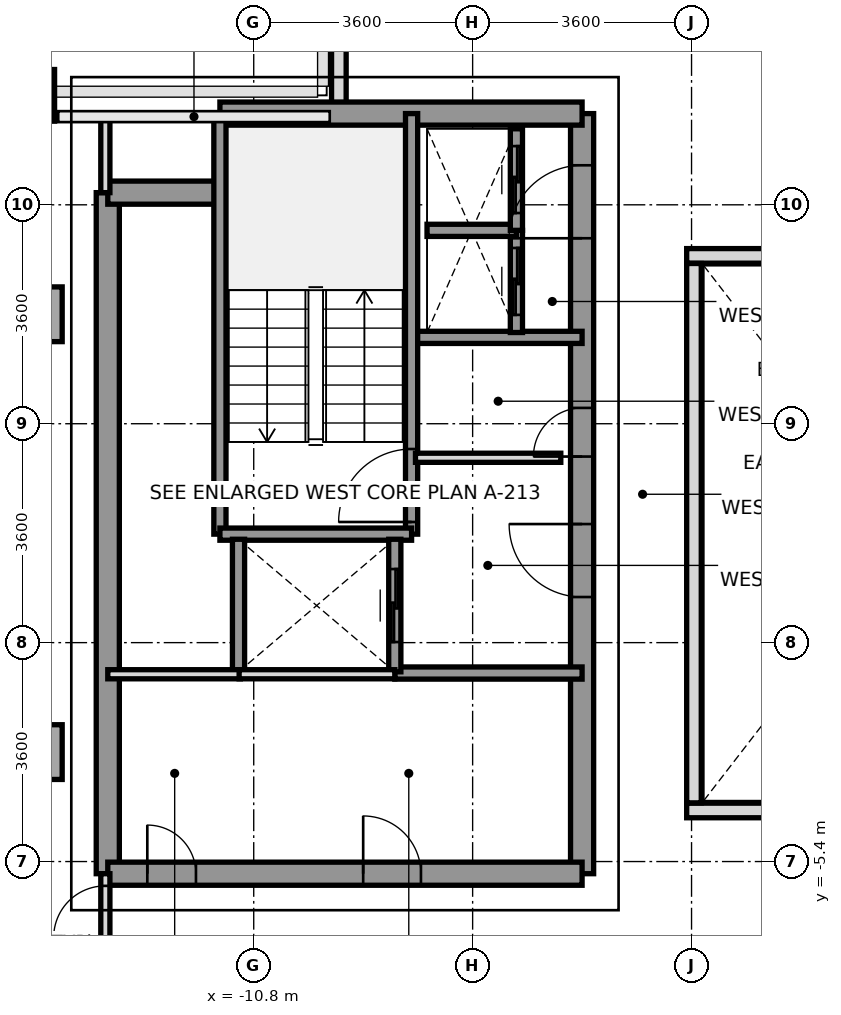
"""IFC4 building model, lengths in metres.
Left out: names, types, materials, properties, quantities, classifications, styles, units other than length and angle.
Written with IfcOpenShell. Run it as: python <this file> out.ifc"""

import sys

from ifc_helpers import new_model, si_unit, direction, frame, frame_2d, origin, origin_2d, place, context, subcontext, project, spatial, rectangle, extrude, source, transform, mapped, element, fill, save


model = new_model("IFC4")
c1 = context("Model", 3, precision=1e-05, world=origin(), true_north=direction((0.0, 1.0)))
c2 = subcontext(c1, "Body", "Model", "MODEL_VIEW")
j1 = project(units=[si_unit("LENGTHUNIT", "METRE"), si_unit("PLANEANGLEUNIT", "RADIAN")], contexts=[c1])
p1 = place(None, origin())
s1 = spatial("IfcSite", under=j1, at=p1, CompositionType="ELEMENT")
p2 = place(p1, origin())
s2 = spatial("IfcBuilding", under=s1, at=p2, CompositionType="ELEMENT")
p3 = place(p2, frame((0.0, 0.0, 208.0)))
s3 = spatial("IfcBuildingStorey", under=s2, at=p3, CompositionType="ELEMENT", Elevation=208.0)
m1 = source(origin(), c2, "Body", "SweptSolid", [
    extrude(rectangle(XDim=0.9, YDim=0.9, at=origin_2d()), origin(), (0.0, 0.0, 1.0), 3.2),
])
for number, where, z_axis, x_axis in (
    (1, (-14.4, -3.6, 0.0), (0.0, 0.0, 1.0), (1.0, 0.0, 0.0)),
    (2, (-14.4, 3.6, 0.0), (0.0, 0.0, 1.0), (1.0, 0.0, 0.0)),
):
    element("IfcColumn", number, at=place(p3, frame(where, z_axis=z_axis, x_axis=x_axis)), inside=s3, PredefinedType="COLUMN", context=c2, shape_type="MappedRepresentation", body=[
        mapped(m1, transform((0.0, 0.0, 0.0), x_axis=(1.0, 0.0, 0.0), y_axis=(0.0, 1.0, 0.0), z_axis=(0.0, 0.0, 1.0), scale=1.0)),
    ])
m2 = source(origin(), c2, "Body", "SweptSolid", [
    extrude(rectangle(XDim=0.65, YDim=0.85, at=origin_2d()), origin(), (0.0, 0.0, 1.0), 3.2),
])
p4 = place(p3, frame((-14.4, 7.2, 0.0), z_axis=(0.0, 0.0, 1.0), x_axis=(1.0, 0.0, 0.0)))
e3 = element("IfcColumn", 3, at=p4, inside=s3, PredefinedType="COLUMN", context=c2, shape_type="MappedRepresentation", body=[
    mapped(m2, transform((0.0, 0.0, 0.0), x_axis=(1.0, 0.0, 0.0), y_axis=(0.0, 1.0, 0.0), z_axis=(0.0, 0.0, 1.0), scale=1.0)),
])
p5 = place(p3, frame((-9.4, 6.953, 0.0), z_axis=(0.0, 0.0, 1.0), x_axis=(0.0, 1.0, 0.0)))
e4 = element("IfcWall", 4, at=p5, inside=s3, PredefinedType="PARAPET", context=c2, shape_type="SweptSolid", body=[
    extrude(rectangle(XDim=1.594, YDim=0.24, at=frame_2d((0.797, 0.0))), origin(), (0.0, 0.0, 1.0), 1.15),
])
p6 = place(p3, frame((-13.2, -5.6, 0.0), z_axis=(0.0, 0.0, 1.0), x_axis=(0.0, 1.0, 0.0)))
e5 = element("IfcWall", 5, at=p6, inside=s3, PredefinedType="SHEAR", context=c2, shape_type="SweptSolid", body=[
    extrude(rectangle(XDim=11.2, YDim=0.38, at=frame_2d((5.6, 0.0))), origin(), (0.0, 0.0, 1.0), 3.2),
])
p7 = place(p3, frame((-5.4, -5.6, 0.0), z_axis=(0.0, 0.0, 1.0), x_axis=(0.0, 1.0, 0.0)))
e6 = element("IfcWall", 6, at=p7, inside=s3, PredefinedType="SHEAR", context=c2, shape_type="SweptSolid", body=[
    extrude(rectangle(XDim=12.5, YDim=0.38, at=frame_2d((6.25, 0.0))), origin(), (0.0, 0.0, 1.0), 3.2),
])
p8 = place(p7, frame((4.55, 0.0, 0.0)))
e7 = element("IfcOpeningElement", 7, at=p8, cuts=e6, PredefinedType="OPENING", context=c2, shape_type="SweptSolid", body=[
    extrude(rectangle(XDim=1.2, YDim=2.2, at=frame_2d((0.6, 1.1))), frame((0.0, 0.2, 0.0), z_axis=(0.0, -1.0, 0.0), x_axis=(1.0, 0.0, 0.0)), (0.0, 0.0, 1.0), 0.4),
])
p9 = place(p7, frame((10.45, 0.0, 0.0)))
e8 = element("IfcOpeningElement", 8, at=p9, cuts=e6, PredefinedType="OPENING", context=c2, shape_type="SweptSolid", body=[
    extrude(rectangle(XDim=1.2, YDim=2.2, at=frame_2d((0.6, 1.1))), frame((0.0, 0.2, 0.0), z_axis=(0.0, -1.0, 0.0), x_axis=(1.0, 0.0, 0.0)), (0.0, 0.0, 1.0), 0.4),
])
p10 = place(p7, frame((6.86, 0.0, 0.0)))
e9 = element("IfcOpeningElement", 9, at=p10, cuts=e6, PredefinedType="OPENING", context=c2, shape_type="SweptSolid", body=[
    extrude(rectangle(XDim=0.8, YDim=2.1, at=frame_2d((0.4, 1.05))), frame((0.0, 0.2, 0.0), z_axis=(0.0, -1.0, 0.0), x_axis=(1.0, 0.0, 0.0)), (0.0, 0.0, 1.0), 0.4),
])
p11 = place(p3, frame((-11.356, 6.9, 0.0), z_axis=(0.0, 0.0, 1.0), x_axis=(1.0, 0.0, 0.0)))
e10 = element("IfcWall", 10, at=p11, inside=s3, PredefinedType="SHEAR", context=c2, shape_type="SweptSolid", body=[
    extrude(rectangle(XDim=5.956, YDim=0.38, at=frame_2d((2.978, 0.0))), origin(), (0.0, 0.0, 1.0), 3.2),
])
p12 = place(p3, frame((-13.2, 5.6, 0.0), z_axis=(0.0, 0.0, 1.0), x_axis=(1.0, 0.0, 0.0)))
e11 = element("IfcWall", 11, at=p12, inside=s3, PredefinedType="SHEAR", context=c2, shape_type="SweptSolid", body=[
    extrude(rectangle(XDim=1.844, YDim=0.38, at=frame_2d((0.922, 0.0))), origin(), (0.0, 0.0, 1.0), 3.2),
])
p13 = place(p3, frame((-13.2, -5.6, 0.0), z_axis=(0.0, 0.0, 1.0), x_axis=(1.0, 0.0, 0.0)))
e12 = element("IfcWall", 12, at=p13, inside=s3, PredefinedType="SHEAR", context=c2, shape_type="SweptSolid", body=[
    extrude(rectangle(XDim=7.8, YDim=0.38, at=frame_2d((3.9, 0.0))), origin(), (0.0, 0.0, 1.0), 3.2),
])
p14 = place(p13, frame((0.65, 0.0, 0.0)))
e13 = element("IfcOpeningElement", 13, at=p14, cuts=e12, PredefinedType="OPENING", context=c2, shape_type="SweptSolid", body=[
    extrude(rectangle(XDim=0.8, YDim=2.1, at=frame_2d((0.4, 1.05))), frame((0.0, 0.2, 0.0), z_axis=(0.0, -1.0, 0.0), x_axis=(1.0, 0.0, 0.0)), (0.0, 0.0, 1.0), 0.4),
])
p15 = place(p13, frame((4.2, 0.0, 0.0)))
e14 = element("IfcOpeningElement", 14, at=p15, cuts=e12, PredefinedType="OPENING", context=c2, shape_type="SweptSolid", body=[
    extrude(rectangle(XDim=0.95, YDim=2.15, at=frame_2d((0.475, 1.075))), frame((0.0, 0.2, 0.0), z_axis=(0.0, -1.0, 0.0), x_axis=(1.0, 0.0, 0.0)), (0.0, 0.0, 1.0), 0.4),
])
p16 = place(p3, frame((-8.18, 3.22, 0.0), z_axis=(0.0, 0.0, 1.0), x_axis=(1.0, 0.0, 0.0)))
e15 = element("IfcWall", 15, at=p16, inside=s3, PredefinedType="SOLIDWALL", context=c2, shape_type="SweptSolid", body=[
    extrude(rectangle(XDim=2.78, YDim=0.2, at=frame_2d((1.39, 0.0))), origin(), (0.0, 0.0, 1.0), 3.2),
])
p17 = place(p3, frame((-8.48, -2.3, 0.0), z_axis=(0.0, 0.0, 1.0), x_axis=(1.0, 0.0, 0.0)))
e16 = element("IfcWall", 16, at=p17, inside=s3, PredefinedType="SOLIDWALL", context=c2, shape_type="SweptSolid", body=[
    extrude(rectangle(XDim=3.08, YDim=0.2, at=frame_2d((1.54, 0.0))), origin(), (0.0, 0.0, 1.0), 3.2),
])
p18 = place(p3, frame((-8.204, -0.016, 0.0), z_axis=(0.0, 0.0, 1.0), x_axis=(0.0, 1.0, 0.0)))
e17 = element("IfcWall", 17, at=p18, inside=s3, PredefinedType="SOLIDWALL", context=c2, shape_type="SweptSolid", body=[
    extrude(rectangle(XDim=6.916, YDim=0.2, at=frame_2d((3.458, 0.0))), origin(), (0.0, 0.0, 1.0), 3.2),
])
p19 = place(p18, frame((0.2, 0.0, 0.0)))
e18 = element("IfcOpeningElement", 18, at=p19, cuts=e17, PredefinedType="OPENING", context=c2, shape_type="SweptSolid", body=[
    extrude(rectangle(XDim=1.2, YDim=2.2, at=frame_2d((0.6, 1.1))), frame((0.0, 0.11, 0.0), z_axis=(0.0, -1.0, 0.0), x_axis=(1.0, 0.0, 0.0)), (0.0, 0.0, 1.0), 0.22),
])
p20 = place(p3, frame((-11.356, -0.016, 0.0), z_axis=(0.0, 0.0, 1.0), x_axis=(0.0, 1.0, 0.0)))
e19 = element("IfcWall", 19, at=p20, inside=s3, PredefinedType="SOLIDWALL", context=c2, shape_type="SweptSolid", body=[
    extrude(rectangle(XDim=6.916, YDim=0.2, at=frame_2d((3.458, 0.0))), origin(), (0.0, 0.0, 1.0), 3.2),
])
p21 = place(p3, frame((-11.356, -0.016, 0.0), z_axis=(0.0, 0.0, 1.0), x_axis=(1.0, 0.0, 0.0)))
e20 = element("IfcWall", 20, at=p21, inside=s3, PredefinedType="SOLIDWALL", context=c2, shape_type="SweptSolid", body=[
    extrude(rectangle(XDim=3.152, YDim=0.2, at=frame_2d((1.576, 0.0))), origin(), (0.0, 0.0, 1.0), 3.2),
])
p22 = place(p3, frame((-11.05, -2.28, 0.0), z_axis=(0.0, 0.0, 1.0), x_axis=(0.0, 1.0, 0.0)))
e21 = element("IfcWall", 21, at=p22, inside=s3, PredefinedType="SOLIDWALL", context=c2, shape_type="SweptSolid", body=[
    extrude(rectangle(XDim=2.18, YDim=0.2, at=frame_2d((1.09, 0.0))), origin(), (0.0, 0.0, 1.0), 3.2),
])
p23 = place(p3, frame((-8.48, -2.28, 0.0), z_axis=(0.0, 0.0, 1.0), x_axis=(0.0, 1.0, 0.0)))
e22 = element("IfcWall", 22, at=p23, inside=s3, PredefinedType="SOLIDWALL", context=c2, shape_type="SweptSolid", body=[
    extrude(rectangle(XDim=2.18, YDim=0.2, at=frame_2d((1.09, 0.0))), origin(), (0.0, 0.0, 1.0), 3.2),
])
p24 = place(p23, frame((0.49, 0.0, 0.0)))
e23 = element("IfcOpeningElement", 23, at=p24, cuts=e22, PredefinedType="OPENING", context=c2, shape_type="SweptSolid", body=[
    extrude(rectangle(XDim=1.2, YDim=2.2, at=frame_2d((0.6, 1.1))), frame((0.0, 0.11, 0.0), z_axis=(0.0, -1.0, 0.0), x_axis=(1.0, 0.0, 0.0)), (0.0, 0.0, 1.0), 0.22),
])
p25 = place(p3, frame((-6.48, 3.3, 0.0), z_axis=(0.0, 0.0, 1.0), x_axis=(0.0, 1.0, 0.0)))
e24 = element("IfcWall", 24, at=p25, inside=s3, PredefinedType="SOLIDWALL", context=c2, shape_type="SweptSolid", body=[
    extrude(rectangle(XDim=1.68, YDim=0.2, at=frame_2d((0.84, 0.0))), origin(), (0.0, 0.0, 1.0), 3.2),
])
p26 = place(p25, frame((0.29, 0.0, 0.0)))
e25 = element("IfcOpeningElement", 25, at=p26, cuts=e24, PredefinedType="OPENING", context=c2, shape_type="SweptSolid", body=[
    extrude(rectangle(XDim=1.1, YDim=2.2, at=frame_2d((0.55, 1.1))), frame((0.0, 0.11, 0.0), z_axis=(0.0, -1.0, 0.0), x_axis=(1.0, 0.0, 0.0)), (0.0, 0.0, 1.0), 0.22),
])
p27 = place(p3, frame((-7.95, 4.98, 0.0), z_axis=(0.0, 0.0, 1.0), x_axis=(1.0, 0.0, 0.0)))
e26 = element("IfcWall", 26, at=p27, inside=s3, PredefinedType="SOLIDWALL", context=c2, shape_type="SweptSolid", body=[
    extrude(rectangle(XDim=1.47, YDim=0.2, at=frame_2d((0.735, 0.0))), origin(), (0.0, 0.0, 1.0), 3.2),
])
p28 = place(p3, frame((-6.48, 4.98, 0.0), z_axis=(0.0, 0.0, 1.0), x_axis=(0.0, 1.0, 0.0)))
e27 = element("IfcWall", 27, at=p28, inside=s3, PredefinedType="SOLIDWALL", context=c2, shape_type="SweptSolid", body=[
    extrude(rectangle(XDim=1.67, YDim=0.2, at=frame_2d((0.835, 0.0))), origin(), (0.0, 0.0, 1.0), 3.2),
])
p29 = place(p28, frame((0.285, 0.0, 0.0)))
e28 = element("IfcOpeningElement", 28, at=p29, cuts=e27, PredefinedType="OPENING", context=c2, shape_type="SweptSolid", body=[
    extrude(rectangle(XDim=1.1, YDim=2.2, at=frame_2d((0.55, 1.1))), frame((0.0, 0.11, 0.0), z_axis=(0.0, -1.0, 0.0), x_axis=(1.0, 0.0, 0.0)), (0.0, 0.0, 1.0), 0.22),
])
p30 = place(p3, frame((-8.14, 1.24, 0.0), z_axis=(0.0, 0.0, 1.0), x_axis=(1.0, 0.0, 0.0)))
e29 = element("IfcWall", 29, at=p30, inside=s3, PredefinedType="PARTITIONING", context=c2, shape_type="SweptSolid", body=[
    extrude(rectangle(XDim=2.39, YDim=0.15, at=frame_2d((1.195, 0.0))), origin(), (0.0, 0.0, 1.0), 2.3),
])
p31 = place(p3, frame((-13.2, -2.32, 0.0), z_axis=(0.0, 0.0, 1.0), x_axis=(1.0, 0.0, 0.0)))
e30 = element("IfcWall", 30, at=p31, inside=s3, PredefinedType="PARTITIONING", context=c2, shape_type="SweptSolid", body=[
    extrude(rectangle(XDim=2.18, YDim=0.15, at=frame_2d((1.09, 0.0))), origin(), (0.0, 0.0, 1.0), 3.2),
])
p32 = place(p3, frame((-11.04, -2.32, 0.0), z_axis=(0.0, 0.0, 1.0), x_axis=(1.0, 0.0, 0.0)))
e31 = element("IfcWall", 31, at=p32, inside=s3, PredefinedType="PARTITIONING", context=c2, shape_type="SweptSolid", body=[
    extrude(rectangle(XDim=2.56, YDim=0.15, at=frame_2d((1.28, 0.0))), origin(), (0.0, 0.0, 1.0), 3.2),
])
p33 = place(p3, frame((-13.24, 5.6, 0.0), z_axis=(0.0, 0.0, 1.0), x_axis=(0.0, 1.0, 0.0)))
e32 = element("IfcWall", 32, at=p33, inside=s3, PredefinedType="PARTITIONING", context=c2, shape_type="SweptSolid", body=[
    extrude(rectangle(XDim=1.25, YDim=0.15, at=frame_2d((0.625, 0.0))), origin(), (0.0, 0.0, 1.0), 3.2),
])
p34 = place(p3, frame((-13.24, -6.85, 0.0), z_axis=(0.0, 0.0, 1.0), x_axis=(0.0, 1.0, 0.0)))
e33 = element("IfcWall", 33, at=p34, inside=s3, PredefinedType="PARTITIONING", context=c2, shape_type="SweptSolid", body=[
    extrude(rectangle(XDim=1.25, YDim=0.15, at=frame_2d((0.625, 0.0))), origin(), (0.0, 0.0, 1.0), 3.2),
])
p35 = place(p34, frame((0.2, 0.0, 0.0)))
e34 = element("IfcOpeningElement", 34, at=p35, cuts=e33, PredefinedType="OPENING", context=c2, shape_type="SweptSolid", body=[
    extrude(rectangle(XDim=0.85, YDim=2.1, at=frame_2d((0.425, 1.05))), frame((0.0, 0.085, 0.0), z_axis=(0.0, -1.0, 0.0), x_axis=(1.0, 0.0, 0.0)), (0.0, 0.0, 1.0), 0.17),
])
for number, where, z_axis, x_axis in (
    (35, (-3.68, -4.56, 0.0), (0.0, 0.0, 1.0), (1.0, 0.0, 0.0)),
    (36, (-3.68, 4.56, 0.0), (0.0, 0.0, 1.0), (1.0, 0.0, 0.0)),
):
    element("IfcWall", number, at=place(p3, frame(where, z_axis=z_axis, x_axis=x_axis)), inside=s3, PredefinedType="PARAPET", context=c2, shape_type="SweptSolid", body=[
        extrude(rectangle(XDim=7.36, YDim=0.24, at=frame_2d((3.68, 0.0))), origin(), (0.0, 0.0, 1.0), 1.15),
    ])
p36 = place(p3, frame((-3.56, -4.435, 0.0), z_axis=(0.0, 0.0, 1.0), x_axis=(0.0, 1.0, 0.0)))
e37 = element("IfcWall", 37, at=p36, inside=s3, PredefinedType="PARAPET", context=c2, shape_type="SweptSolid", body=[
    extrude(rectangle(XDim=8.87, YDim=0.24, at=frame_2d((4.435, 0.0))), origin(), (0.0, 0.0, 1.0), 1.15),
])
m3 = source(origin(), c2, "Body", "SweptSolid", [
    extrude(rectangle(XDim=1.2, YDim=2.2, at=frame_2d((0.6, 1.1))), frame((0.0, 0.025, 0.0), z_axis=(0.0, -1.0, 0.0), x_axis=(1.0, 0.0, 0.0)), (0.0, 0.0, 1.0), 0.05),
])
p37 = place(p19, origin())
e38 = element("IfcDoor", 38, at=p37, inside=s3, OperationType="SINGLE_SWING_LEFT", PredefinedType="DOOR", context=c2, shape_type="MappedRepresentation", body=[
    mapped(m3, transform((0.0, 0.0, 0.0), x_axis=(1.0, 0.0, 0.0), y_axis=(0.0, 1.0, 0.0), z_axis=(0.0, 0.0, 1.0), scale=1.0)),
])
fill(e18, e38)
p38 = place(p8, origin())
e39 = element("IfcDoor", 39, at=p38, inside=s3, OperationType="SINGLE_SWING_RIGHT", PredefinedType="DOOR", context=c2, shape_type="MappedRepresentation", body=[
    mapped(m3, transform((0.0, 0.0, 0.0), x_axis=(1.0, 0.0, 0.0), y_axis=(0.0, 1.0, 0.0), z_axis=(0.0, 0.0, 1.0), scale=1.0)),
])
fill(e7, e39)
p39 = place(p9, origin())
e40 = element("IfcDoor", 40, at=p39, inside=s3, OperationType="SINGLE_SWING_LEFT", PredefinedType="DOOR", context=c2, shape_type="MappedRepresentation", body=[
    mapped(m3, transform((0.0, 0.0, 0.0), x_axis=(1.0, 0.0, 0.0), y_axis=(0.0, 1.0, 0.0), z_axis=(0.0, 0.0, 1.0), scale=1.0)),
])
fill(e8, e40)
m4 = source(origin(), c2, "Body", "SweptSolid", [
    extrude(rectangle(XDim=0.8, YDim=2.1, at=frame_2d((0.4, 1.05))), frame((0.0, 0.025, 0.0), z_axis=(0.0, -1.0, 0.0), x_axis=(1.0, 0.0, 0.0)), (0.0, 0.0, 1.0), 0.05),
])
p40 = place(p10, origin())
e41 = element("IfcDoor", 41, at=p40, inside=s3, OperationType="SINGLE_SWING_LEFT", PredefinedType="DOOR", context=c2, shape_type="MappedRepresentation", body=[
    mapped(m4, transform((0.0, 0.0, 0.0), x_axis=(1.0, 0.0, 0.0), y_axis=(0.0, 1.0, 0.0), z_axis=(0.0, 0.0, 1.0), scale=1.0)),
])
fill(e9, e41)
p41 = place(p14, origin())
e42 = element("IfcDoor", 42, at=p41, inside=s3, OperationType="SINGLE_SWING_LEFT", PredefinedType="DOOR", context=c2, shape_type="MappedRepresentation", body=[
    mapped(m4, transform((0.0, 0.0, 0.0), x_axis=(1.0, 0.0, 0.0), y_axis=(0.0, 1.0, 0.0), z_axis=(0.0, 0.0, 1.0), scale=1.0)),
])
fill(e13, e42)
m5 = source(origin(), c2, "Body", "SweptSolid", [
    extrude(rectangle(XDim=0.95, YDim=2.15, at=frame_2d((0.475, 1.075))), frame((0.0, 0.025, 0.0), z_axis=(0.0, -1.0, 0.0), x_axis=(1.0, 0.0, 0.0)), (0.0, 0.0, 1.0), 0.05),
])
p42 = place(p15, origin())
e43 = element("IfcDoor", 43, at=p42, inside=s3, OperationType="SINGLE_SWING_LEFT", PredefinedType="DOOR", context=c2, shape_type="MappedRepresentation", body=[
    mapped(m5, transform((0.0, 0.0, 0.0), x_axis=(1.0, 0.0, 0.0), y_axis=(0.0, 1.0, 0.0), z_axis=(0.0, 0.0, 1.0), scale=1.0)),
])
fill(e14, e43)
p43 = place(p24, origin())
e44 = element("IfcDoor", 44, at=p43, inside=s3, OperationType="SLIDING_TO_RIGHT", PredefinedType="DOOR", context=c2, shape_type="MappedRepresentation", body=[
    mapped(m3, transform((0.0, 0.0, 0.0), x_axis=(1.0, 0.0, 0.0), y_axis=(0.0, 1.0, 0.0), z_axis=(0.0, 0.0, 1.0), scale=1.0)),
])
fill(e23, e44)
m6 = source(origin(), c2, "Body", "SweptSolid", [
    extrude(rectangle(XDim=1.1, YDim=2.2, at=frame_2d((0.55, 1.1))), frame((0.0, 0.025, 0.0), z_axis=(0.0, -1.0, 0.0), x_axis=(1.0, 0.0, 0.0)), (0.0, 0.0, 1.0), 0.05),
])
p44 = place(p26, origin())
e45 = element("IfcDoor", 45, at=p44, inside=s3, OperationType="SLIDING_TO_LEFT", PredefinedType="DOOR", context=c2, shape_type="MappedRepresentation", body=[
    mapped(m6, transform((0.0, 0.0, 0.0), x_axis=(1.0, 0.0, 0.0), y_axis=(0.0, 1.0, 0.0), z_axis=(0.0, 0.0, 1.0), scale=1.0)),
])
fill(e25, e45)
p45 = place(p29, origin())
e46 = element("IfcDoor", 46, at=p45, inside=s3, OperationType="SLIDING_TO_LEFT", PredefinedType="DOOR", context=c2, shape_type="MappedRepresentation", body=[
    mapped(m6, transform((0.0, 0.0, 0.0), x_axis=(1.0, 0.0, 0.0), y_axis=(0.0, 1.0, 0.0), z_axis=(0.0, 0.0, 1.0), scale=1.0)),
])
fill(e28, e46)
m7 = source(origin(), c2, "Body", "SweptSolid", [
    extrude(rectangle(XDim=0.85, YDim=2.1, at=frame_2d((0.425, 1.05))), frame((0.0, 0.025, 0.0), z_axis=(0.0, -1.0, 0.0), x_axis=(1.0, 0.0, 0.0)), (0.0, 0.0, 1.0), 0.05),
])
p46 = place(p35, origin())
e47 = element("IfcDoor", 47, at=p46, inside=s3, OperationType="SINGLE_SWING_LEFT", PredefinedType="DOOR", context=c2, shape_type="MappedRepresentation", body=[
    mapped(m7, transform((0.0, 0.0, 0.0), x_axis=(1.0, 0.0, 0.0), y_axis=(0.0, 1.0, 0.0), z_axis=(0.0, 0.0, 1.0), scale=1.0)),
])
fill(e34, e47)
save(model, sys.argv[1])
